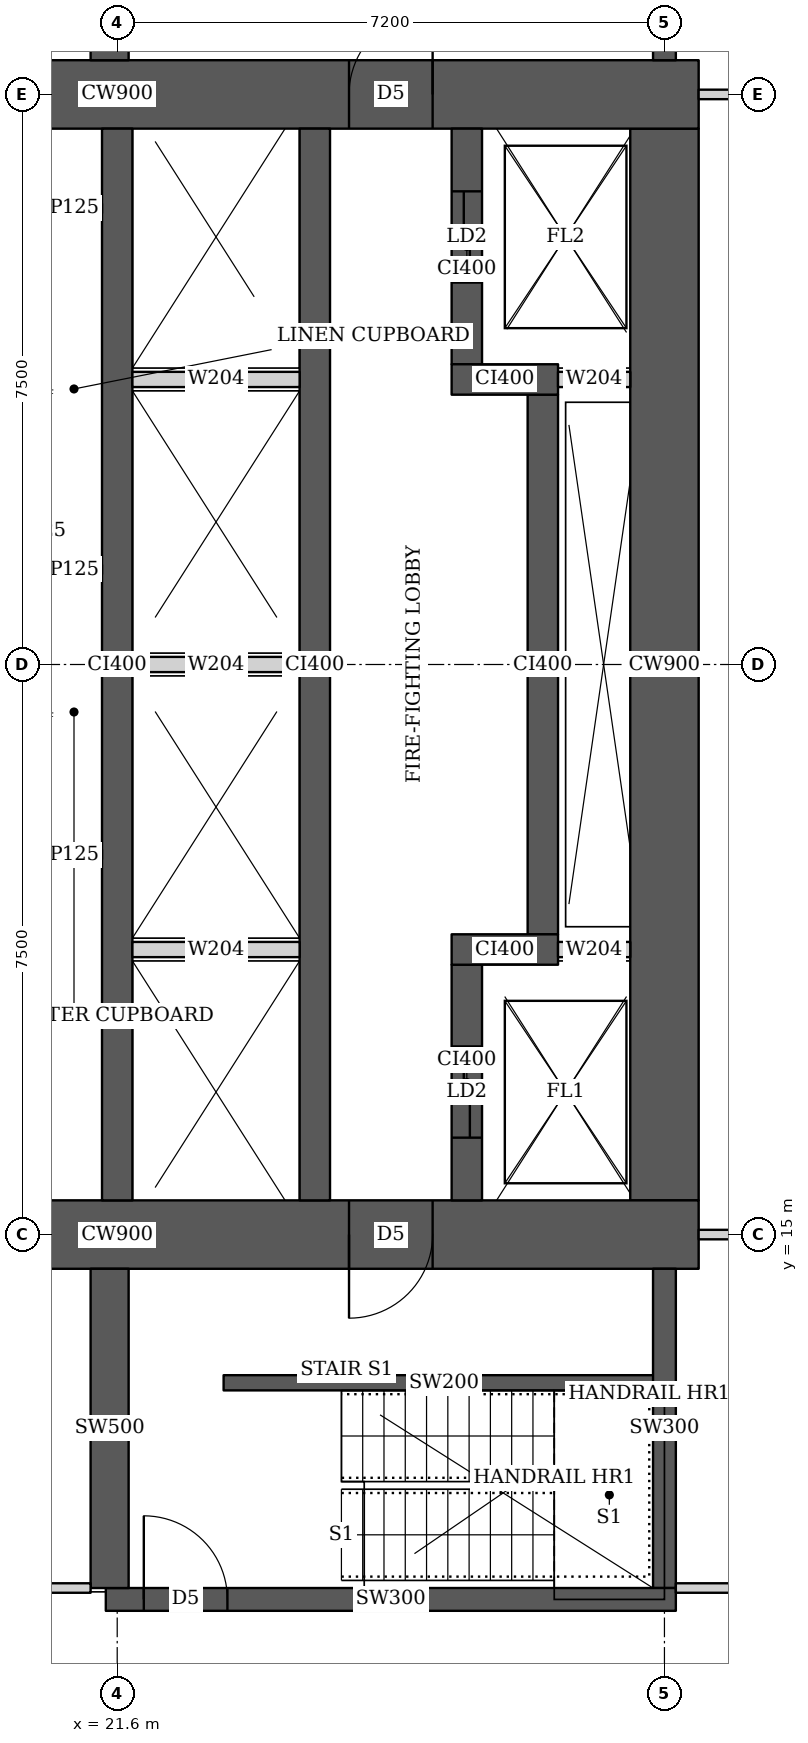
"""IFC4 building model, lengths in metres.
Left out: names, types, materials, properties, quantities, classifications, styles, units other than length and angle.
Written with IfcOpenShell. Run it as: python <this file> out.ifc"""

import sys

from ifc_helpers import new_model, si_unit, direction, frame, frame_2d, origin, place, context, subcontext, project, spatial, rectangle, extrude, element, fill, save


model = new_model("IFC4")
c1 = context("Model", 3, precision=1e-05, world=origin(), true_north=direction((0.0, 1.0)))
c2 = subcontext(c1, "Body", "Model", "MODEL_VIEW")
j1 = project(units=[si_unit("LENGTHUNIT", "METRE"), si_unit("PLANEANGLEUNIT", "RADIAN")], contexts=[c1])
p1 = place(None, origin())
s1 = spatial("IfcSite", under=j1, at=p1, CompositionType="ELEMENT")
p2 = place(p1, origin())
s2 = spatial("IfcBuilding", under=s1, at=p2, CompositionType="ELEMENT")
p3 = place(p2, frame((0.0, 0.0, 111.65)))
s3 = spatial("IfcBuildingStorey", under=s2, at=p3, CompositionType="ELEMENT", Elevation=111.65)
p4 = place(p3, frame((13.95, 15.0, 0.0), z_axis=(0.0, 0.0, 1.0), x_axis=(1.0, 0.0, 0.0)))
e1 = element("IfcWall", 1, at=p4, inside=s3, PredefinedType="SHEAR", context=c2, shape_type="SweptSolid", body=[
    extrude(rectangle(XDim=15.3, YDim=0.9, at=frame_2d((7.65, 0.0))), origin(), (0.0, 0.0, 1.0), 3.75),
])
p5 = place(p4, frame((4.45, 0.0, 0.0)))
e2 = element("IfcOpeningElement", 2, at=p5, cuts=e1, PredefinedType="OPENING", context=c2, shape_type="SweptSolid", body=[
    extrude(rectangle(XDim=1.8, YDim=2.1, at=frame_2d((0.9, 1.05))), frame((0.0, 0.46, 0.0), z_axis=(0.0, -1.0, 0.0), x_axis=(1.0, 0.0, 0.0)), (0.0, 0.0, 1.0), 0.92),
])
p6 = place(p4, frame((10.7, 0.0, 0.0)))
e3 = element("IfcOpeningElement", 3, at=p6, cuts=e1, PredefinedType="OPENING", context=c2, shape_type="SweptSolid", body=[
    extrude(rectangle(XDim=1.1, YDim=2.1, at=frame_2d((0.55, 1.05))), frame((0.0, 0.46, 0.0), z_axis=(0.0, -1.0, 0.0), x_axis=(1.0, 0.0, 0.0)), (0.0, 0.0, 1.0), 0.92),
])
p7 = place(p3, frame((13.95, 30.0, 0.0), z_axis=(0.0, 0.0, 1.0), x_axis=(1.0, 0.0, 0.0)))
e4 = element("IfcWall", 4, at=p7, inside=s3, PredefinedType="SHEAR", context=c2, shape_type="SweptSolid", body=[
    extrude(rectangle(XDim=15.3, YDim=0.9, at=frame_2d((7.65, 0.0))), origin(), (0.0, 0.0, 1.0), 3.75),
])
p8 = place(p7, frame((4.45, 0.0, 0.0)))
e5 = element("IfcOpeningElement", 5, at=p8, cuts=e4, PredefinedType="OPENING", context=c2, shape_type="SweptSolid", body=[
    extrude(rectangle(XDim=1.8, YDim=2.1, at=frame_2d((0.9, 1.05))), frame((0.0, 0.46, 0.0), z_axis=(0.0, -1.0, 0.0), x_axis=(1.0, 0.0, 0.0)), (0.0, 0.0, 1.0), 0.92),
])
p9 = place(p7, frame((10.7, 0.0, 0.0)))
e6 = element("IfcOpeningElement", 6, at=p9, cuts=e4, PredefinedType="OPENING", context=c2, shape_type="SweptSolid", body=[
    extrude(rectangle(XDim=1.1, YDim=2.1, at=frame_2d((0.55, 1.05))), frame((0.0, 0.46, 0.0), z_axis=(0.0, -1.0, 0.0), x_axis=(1.0, 0.0, 0.0)), (0.0, 0.0, 1.0), 0.92),
])
p10 = place(p3, frame((28.8, 15.45, 0.0), z_axis=(0.0, 0.0, 1.0), x_axis=(0.0, 1.0, 0.0)))
e7 = element("IfcWall", 7, at=p10, inside=s3, PredefinedType="SHEAR", context=c2, shape_type="SweptSolid", body=[
    extrude(rectangle(XDim=14.1, YDim=0.9, at=frame_2d((7.05, 0.0))), origin(), (0.0, 0.0, 1.0), 3.75),
])
for number, where, z_axis, x_axis in (
    (8, (21.6, 15.45, 0.0), (0.0, 0.0, 1.0), (0.0, 1.0, 0.0)),
    (9, (24.2, 15.45, 0.0), (0.0, 0.0, 1.0), (0.0, 1.0, 0.0)),
):
    element("IfcWall", number, at=place(p3, frame(where, z_axis=z_axis, x_axis=x_axis)), inside=s3, PredefinedType="SHEAR", context=c2, shape_type="SweptSolid", body=[
        extrude(rectangle(XDim=14.1, YDim=0.4, at=frame_2d((7.05, 0.0))), origin(), (0.0, 0.0, 1.0), 3.75),
    ])
p11 = place(p3, frame((26.2, 15.45, 0.0), z_axis=(0.0, 0.0, 1.0), x_axis=(0.0, 1.0, 0.0)))
e10 = element("IfcWall", 10, at=p11, inside=s3, PredefinedType="SHEAR", context=c2, shape_type="SweptSolid", body=[
    extrude(rectangle(XDim=3.1, YDim=0.4, at=frame_2d((1.55, 0.0))), origin(), (0.0, 0.0, 1.0), 3.75),
])
p12 = place(p11, frame((0.825, 0.0, 0.0)))
e11 = element("IfcOpeningElement", 11, at=p12, cuts=e10, PredefinedType="OPENING", context=c2, shape_type="SweptSolid", body=[
    extrude(rectangle(XDim=1.2, YDim=2.1, at=frame_2d((0.6, 1.05))), frame((0.0, 0.21, 0.0), z_axis=(0.0, -1.0, 0.0), x_axis=(1.0, 0.0, 0.0)), (0.0, 0.0, 1.0), 0.42),
])
p13 = place(p3, frame((26.0, 18.75, 0.0), z_axis=(0.0, 0.0, 1.0), x_axis=(1.0, 0.0, 0.0)))
e12 = element("IfcWall", 12, at=p13, inside=s3, PredefinedType="SHEAR", context=c2, shape_type="SweptSolid", body=[
    extrude(rectangle(XDim=1.4, YDim=0.4, at=frame_2d((0.7, 0.0))), origin(), (0.0, 0.0, 1.0), 3.75),
])
p14 = place(p3, frame((27.2, 18.95, 0.0), z_axis=(0.0, 0.0, 1.0), x_axis=(0.0, 1.0, 0.0)))
e13 = element("IfcWall", 13, at=p14, inside=s3, PredefinedType="SHEAR", context=c2, shape_type="SweptSolid", body=[
    extrude(rectangle(XDim=7.1, YDim=0.4, at=frame_2d((3.55, 0.0))), origin(), (0.0, 0.0, 1.0), 3.75),
])
p15 = place(p3, frame((26.0, 26.25, 0.0), z_axis=(0.0, 0.0, 1.0), x_axis=(1.0, 0.0, 0.0)))
e14 = element("IfcWall", 14, at=p15, inside=s3, PredefinedType="SHEAR", context=c2, shape_type="SweptSolid", body=[
    extrude(rectangle(XDim=1.4, YDim=0.4, at=frame_2d((0.7, 0.0))), origin(), (0.0, 0.0, 1.0), 3.75),
])
p16 = place(p3, frame((26.2, 26.45, 0.0), z_axis=(0.0, 0.0, 1.0), x_axis=(0.0, 1.0, 0.0)))
e15 = element("IfcWall", 15, at=p16, inside=s3, PredefinedType="SHEAR", context=c2, shape_type="SweptSolid", body=[
    extrude(rectangle(XDim=3.1, YDim=0.4, at=frame_2d((1.55, 0.0))), origin(), (0.0, 0.0, 1.0), 3.75),
])
p17 = place(p16, frame((1.075, 0.0, 0.0)))
e16 = element("IfcOpeningElement", 16, at=p17, cuts=e15, PredefinedType="OPENING", context=c2, shape_type="SweptSolid", body=[
    extrude(rectangle(XDim=1.2, YDim=2.1, at=frame_2d((0.6, 1.05))), frame((0.0, 0.21, 0.0), z_axis=(0.0, -1.0, 0.0), x_axis=(1.0, 0.0, 0.0)), (0.0, 0.0, 1.0), 0.42),
])
p18 = place(p3, frame((21.45, 10.2, 0.0), z_axis=(0.0, 0.0, 1.0), x_axis=(1.0, 0.0, 0.0)))
e17 = element("IfcWall", 17, at=p18, inside=s3, PredefinedType="SHEAR", context=c2, shape_type="SweptSolid", body=[
    extrude(rectangle(XDim=7.5, YDim=0.3, at=frame_2d((3.75, 0.0))), origin(), (0.0, 0.0, 1.0), 3.75),
])
p19 = place(p18, frame((0.5, 0.0, 0.0)))
e18 = element("IfcOpeningElement", 18, at=p19, cuts=e17, PredefinedType="OPENING", context=c2, shape_type="SweptSolid", body=[
    extrude(rectangle(XDim=1.1, YDim=2.1, at=frame_2d((0.55, 1.05))), frame((0.0, 0.16, 0.0), z_axis=(0.0, -1.0, 0.0), x_axis=(1.0, 0.0, 0.0)), (0.0, 0.0, 1.0), 0.32),
])
p20 = place(p3, frame((21.5, 10.35, 0.0), z_axis=(0.0, 0.0, 1.0), x_axis=(0.0, 1.0, 0.0)))
e19 = element("IfcWall", 19, at=p20, inside=s3, PredefinedType="SHEAR", context=c2, shape_type="SweptSolid", body=[
    extrude(rectangle(XDim=4.2, YDim=0.5, at=frame_2d((2.1, 0.0))), origin(), (0.0, 0.0, 1.0), 3.75),
])
p21 = place(p3, frame((28.8, 10.35, 0.0), z_axis=(0.0, 0.0, 1.0), x_axis=(0.0, 1.0, 0.0)))
e20 = element("IfcWall", 20, at=p21, inside=s3, PredefinedType="SHEAR", context=c2, shape_type="SweptSolid", body=[
    extrude(rectangle(XDim=4.2, YDim=0.3, at=frame_2d((2.1, 0.0))), origin(), (0.0, 0.0, 1.0), 3.75),
])
p22 = place(p3, frame((21.5, 30.45, 0.0), z_axis=(0.0, 0.0, 1.0), x_axis=(0.0, 1.0, 0.0)))
e21 = element("IfcWall", 21, at=p22, inside=s3, PredefinedType="SHEAR", context=c2, shape_type="SweptSolid", body=[
    extrude(rectangle(XDim=4.2, YDim=0.5, at=frame_2d((2.1, 0.0))), origin(), (0.0, 0.0, 1.0), 3.75),
])
p23 = place(p3, frame((28.8, 30.45, 0.0), z_axis=(0.0, 0.0, 1.0), x_axis=(0.0, 1.0, 0.0)))
e22 = element("IfcWall", 22, at=p23, inside=s3, PredefinedType="SHEAR", context=c2, shape_type="SweptSolid", body=[
    extrude(rectangle(XDim=4.2, YDim=0.3, at=frame_2d((2.1, 0.0))), origin(), (0.0, 0.0, 1.0), 3.75),
])
p24 = place(p3, frame((10.413, 10.35, 0.0), z_axis=(0.0, 0.0, 1.0), x_axis=(1.0, 0.0, 0.0)))
e23 = element("IfcWall", 23, at=p24, inside=s3, PredefinedType="PARTITIONING", context=c2, shape_type="SweptSolid", body=[
    extrude(rectangle(XDim=10.837, YDim=0.125, at=frame_2d((5.418, 0.0))), origin(), (0.0, 0.0, 1.0), 3.5),
])
p25 = place(p24, frame((7.582, 0.0, 0.0)))
e24 = element("IfcOpeningElement", 24, at=p25, cuts=e23, PredefinedType="OPENING", context=c2, shape_type="SweptSolid", body=[
    extrude(rectangle(XDim=1.8, YDim=2.1, at=frame_2d((0.9, 1.05))), frame((0.0, 0.073, 0.0), z_axis=(0.0, -1.0, 0.0), x_axis=(1.0, 0.0, 0.0)), (0.0, 0.0, 1.0), 0.145),
])
p26 = place(p3, frame((28.95, 10.35, 0.0), z_axis=(0.0, 0.0, 1.0), x_axis=(1.0, 0.0, 0.0)))
e25 = element("IfcWall", 25, at=p26, inside=s3, PredefinedType="PARTITIONING", context=c2, shape_type="SweptSolid", body=[
    extrude(rectangle(XDim=8.886, YDim=0.125, at=frame_2d((4.443, 0.0))), origin(), (0.0, 0.0, 1.0), 3.5),
])
p27 = place(p3, frame((29.25, 15.0, 0.0), z_axis=(0.0, 0.0, 1.0), x_axis=(1.0, 0.0, 0.0)))
e26 = element("IfcWall", 26, at=p27, inside=s3, PredefinedType="PARTITIONING", context=c2, shape_type="SweptSolid", body=[
    extrude(rectangle(XDim=5.949, YDim=0.125, at=frame_2d((2.975, 0.0))), origin(), (0.0, 0.0, 1.0), 3.5),
])
p28 = place(p3, frame((29.25, 30.0, 0.0), z_axis=(0.0, 0.0, 1.0), x_axis=(1.0, 0.0, 0.0)))
e27 = element("IfcWall", 27, at=p28, inside=s3, PredefinedType="PARTITIONING", context=c2, shape_type="SweptSolid", body=[
    extrude(rectangle(XDim=2.949, YDim=0.125, at=frame_2d((1.475, 0.0))), origin(), (0.0, 0.0, 1.0), 3.5),
])
for number, where, z_axis, x_axis in (
    (28, (20.663, 20.0, 0.0), (0.0, 0.0, 1.0), (1.0, 0.0, 0.0)),
    (29, (20.663, 28.5, 0.0), (0.0, 0.0, 1.0), (1.0, 0.0, 0.0)),
    (30, (20.663, 23.75, 0.0), (0.0, 0.0, 1.0), (1.0, 0.0, 0.0)),
):
    element("IfcWall", number, at=place(p3, frame(where, z_axis=z_axis, x_axis=x_axis)), inside=s3, PredefinedType="PARTITIONING", context=c2, shape_type="SweptSolid", body=[
        extrude(rectangle(XDim=0.737, YDim=0.125, at=frame_2d((0.368, 0.0))), origin(), (0.0, 0.0, 1.0), 3.5),
    ])
p29 = place(p3, frame((23.0, 13.05, 0.0), z_axis=(0.0, 0.0, 1.0), x_axis=(1.0, 0.0, 0.0)))
e31 = element("IfcWall", 31, at=p29, inside=s3, PredefinedType="SHEAR", context=c2, shape_type="SweptSolid", body=[
    extrude(rectangle(XDim=5.8, YDim=0.2, at=frame_2d((2.9, 0.0))), origin(), (0.0, 0.0, 1.0), 3.75),
])
for number, where, z_axis, x_axis in (
    (32, (21.8, 18.75, 0.0), (0.0, 0.0, 1.0), (1.0, 0.0, 0.0)),
    (33, (21.8, 22.5, 0.0), (0.0, 0.0, 1.0), (1.0, 0.0, 0.0)),
    (34, (21.8, 26.25, 0.0), (0.0, 0.0, 1.0), (1.0, 0.0, 0.0)),
):
    element("IfcWall", number, at=place(p3, frame(where, z_axis=z_axis, x_axis=x_axis)), inside=s3, PredefinedType="SOLIDWALL", context=c2, shape_type="SweptSolid", body=[
        extrude(rectangle(XDim=2.2, YDim=0.2, at=frame_2d((1.1, 0.0))), origin(), (0.0, 0.0, 1.0), 3.5),
    ])
for number, where, z_axis, x_axis in (
    (35, (27.4, 18.75, 0.0), (0.0, 0.0, 1.0), (1.0, 0.0, 0.0)),
    (36, (27.4, 26.25, 0.0), (0.0, 0.0, 1.0), (1.0, 0.0, 0.0)),
):
    element("IfcWall", number, at=place(p3, frame(where, z_axis=z_axis, x_axis=x_axis)), inside=s3, PredefinedType="SOLIDWALL", context=c2, shape_type="SweptSolid", body=[
        extrude(rectangle(XDim=0.95, YDim=0.2, at=frame_2d((0.475, 0.0))), origin(), (0.0, 0.0, 1.0), 3.5),
    ])
p30 = place(p6, origin())
e37 = element("IfcDoor", 37, at=p30, inside=s3, OperationType="SINGLE_SWING_RIGHT", PredefinedType="DOOR", context=c2, shape_type="SweptSolid", body=[
    extrude(rectangle(XDim=1.1, YDim=2.1, at=frame_2d((0.55, 1.05))), frame((0.0, 0.025, 0.0), z_axis=(0.0, -1.0, 0.0), x_axis=(1.0, 0.0, 0.0)), (0.0, 0.0, 1.0), 0.05),
])
fill(e3, e37)
p31 = place(p9, origin())
e38 = element("IfcDoor", 38, at=p31, inside=s3, OperationType="SINGLE_SWING_RIGHT", PredefinedType="DOOR", context=c2, shape_type="SweptSolid", body=[
    extrude(rectangle(XDim=1.1, YDim=2.1, at=frame_2d((0.55, 1.05))), frame((0.0, 0.025, 0.0), z_axis=(0.0, -1.0, 0.0), x_axis=(1.0, 0.0, 0.0)), (0.0, 0.0, 1.0), 0.05),
])
fill(e6, e38)
p32 = place(p12, origin())
e39 = element("IfcDoor", 39, at=p32, inside=s3, OperationType="DOUBLE_DOOR_SLIDING", PredefinedType="DOOR", context=c2, shape_type="SweptSolid", body=[
    extrude(rectangle(XDim=1.2, YDim=2.1, at=frame_2d((0.6, 1.05))), frame((0.0, 0.025, 0.0), z_axis=(0.0, -1.0, 0.0), x_axis=(1.0, 0.0, 0.0)), (0.0, 0.0, 1.0), 0.05),
])
fill(e11, e39)
p33 = place(p17, origin())
e40 = element("IfcDoor", 40, at=p33, inside=s3, OperationType="DOUBLE_DOOR_SLIDING", PredefinedType="DOOR", context=c2, shape_type="SweptSolid", body=[
    extrude(rectangle(XDim=1.2, YDim=2.1, at=frame_2d((0.6, 1.05))), frame((0.0, 0.025, 0.0), z_axis=(0.0, -1.0, 0.0), x_axis=(1.0, 0.0, 0.0)), (0.0, 0.0, 1.0), 0.05),
])
fill(e16, e40)
p34 = place(p19, origin())
e41 = element("IfcDoor", 41, at=p34, inside=s3, OperationType="SINGLE_SWING_LEFT", PredefinedType="DOOR", context=c2, shape_type="SweptSolid", body=[
    extrude(rectangle(XDim=1.1, YDim=2.1, at=frame_2d((0.55, 1.05))), frame((0.0, 0.025, 0.0), z_axis=(0.0, -1.0, 0.0), x_axis=(1.0, 0.0, 0.0)), (0.0, 0.0, 1.0), 0.05),
])
fill(e18, e41)
save(model, sys.argv[1])
